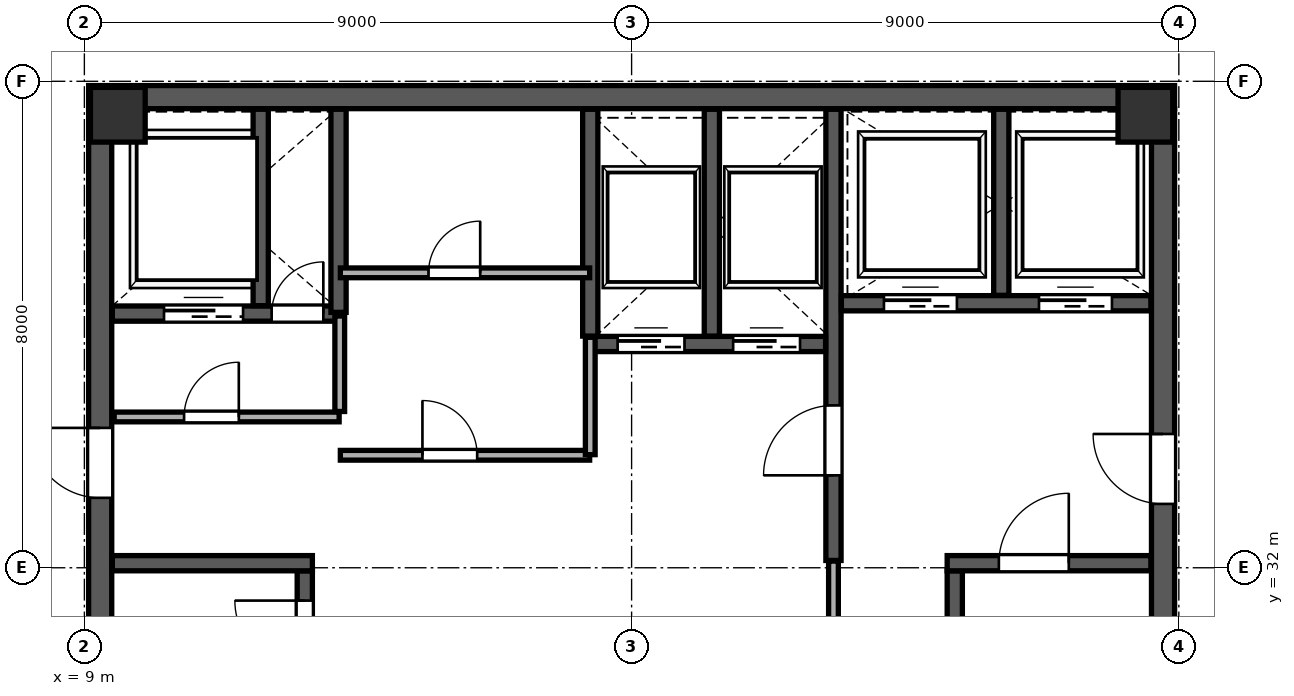
"""IFC4 building model, lengths in metres.
Left out: names, types, materials, properties, quantities, classifications, styles, units other than length and angle.
Written with IfcOpenShell. Run it as: python <this file> out.ifc"""

import sys

from ifc_helpers import new_model, si_unit, direction, frame, frame_2d, origin, origin_2d, place, context, subcontext, project, spatial, rectangle, extrude, source, transform, mapped, element, fill, save


model = new_model("IFC4")
c1 = context("Model", 3, precision=1e-05, world=origin(), true_north=direction((0.0, 1.0)))
c2 = subcontext(c1, "Body", "Model", "MODEL_VIEW")
j1 = project(units=[si_unit("LENGTHUNIT", "METRE"), si_unit("PLANEANGLEUNIT", "RADIAN")], contexts=[c1])
p1 = place(None, origin())
s1 = spatial("IfcSite", under=j1, at=p1, CompositionType="ELEMENT")
p2 = place(p1, origin())
s2 = spatial("IfcBuilding", under=s1, at=p2, CompositionType="ELEMENT")
p3 = place(p2, frame((0.0, 0.0, 319.8)))
s3 = spatial("IfcBuildingStorey", under=s2, at=p3, CompositionType="ELEMENT", Elevation=319.8)
m1 = source(origin(), c2, "Body", "SweptSolid", [
    extrude(rectangle(XDim=0.9, YDim=0.9, at=origin_2d()), origin(), (0.0, 0.0, 1.0), 4.198),
])
for number, where, z_axis, x_axis in (
    (1, (9.55, 39.45, 0.001), (0.0, 0.0, 1.0), (1.0, 0.0, 0.0)),
    (2, (26.45, 39.45, 0.001), (0.0, 0.0, 1.0), (1.0, 0.0, 0.0)),
):
    element("IfcColumn", number, at=place(p3, frame(where, z_axis=z_axis, x_axis=x_axis)), inside=s3, PredefinedType="COLUMN", context=c2, shape_type="MappedRepresentation", body=[
        mapped(m1, transform((0.0, 0.0, 0.0), scale=1.0)),
    ])
p4 = place(p3, frame((9.26, 24.45, 0.0), z_axis=(0.0, 0.0, 1.0), x_axis=(0.0, 1.0, 0.0)))
e3 = element("IfcWall", 3, at=p4, inside=s3, PredefinedType="SHEAR", context=c2, shape_type="SweptSolid", body=[
    extrude(rectangle(XDim=15.1, YDim=0.38, at=frame_2d((7.55, 0.0))), origin(), (0.0, 0.0, 1.0), 3.96),
])
p5 = place(p4, frame((8.7, 0.0, 0.0)))
e4 = element("IfcOpeningElement", 4, at=p5, cuts=e3, PredefinedType="OPENING", context=c2, shape_type="SweptSolid", body=[
    extrude(rectangle(XDim=1.15, YDim=2.2, at=frame_2d((0.575, 1.1))), frame((0.0, 0.2, 0.0), z_axis=(0.0, -1.0, 0.0), x_axis=(1.0, 0.0, 0.0)), (0.0, 0.0, 1.0), 0.4),
])
p6 = place(p3, frame((26.74, 24.45, 0.0), z_axis=(0.0, 0.0, 1.0), x_axis=(0.0, 1.0, 0.0)))
e5 = element("IfcWall", 5, at=p6, inside=s3, PredefinedType="SHEAR", context=c2, shape_type="SweptSolid", body=[
    extrude(rectangle(XDim=15.1, YDim=0.38, at=frame_2d((7.55, 0.0))), origin(), (0.0, 0.0, 1.0), 3.96),
])
p7 = place(p6, frame((8.6, 0.0, 0.0)))
e6 = element("IfcOpeningElement", 6, at=p7, cuts=e5, PredefinedType="OPENING", context=c2, shape_type="SweptSolid", body=[
    extrude(rectangle(XDim=1.15, YDim=2.2, at=frame_2d((0.575, 1.1))), frame((0.0, 0.2, 0.0), z_axis=(0.0, -1.0, 0.0), x_axis=(1.0, 0.0, 0.0)), (0.0, 0.0, 1.0), 0.4),
])
p8 = place(p3, frame((9.07, 39.74, 0.0), z_axis=(0.0, 0.0, 1.0), x_axis=(1.0, 0.0, 0.0)))
e7 = element("IfcWall", 7, at=p8, inside=s3, PredefinedType="SHEAR", context=c2, shape_type="SweptSolid", body=[
    extrude(rectangle(XDim=17.86, YDim=0.38, at=frame_2d((8.93, 0.0))), origin(), (0.0, 0.0, 1.0), 3.96),
])
p9 = place(p3, frame((12.625, 24.46, 0.0), z_axis=(0.0, 0.0, 1.0), x_axis=(0.0, 1.0, 0.0)))
e8 = element("IfcWall", 8, at=p9, inside=s3, PredefinedType="SHEAR", context=c2, shape_type="SweptSolid", body=[
    extrude(rectangle(XDim=7.49, YDim=0.25, at=frame_2d((3.745, 0.0))), origin(), (0.0, 0.0, 1.0), 3.96),
])
p10 = place(p9, frame((5.85, 0.0, 0.0)))
e9 = element("IfcOpeningElement", 9, at=p10, cuts=e8, PredefinedType="OPENING", context=c2, shape_type="SweptSolid", body=[
    extrude(rectangle(XDim=1.15, YDim=2.2, at=frame_2d((0.575, 1.1))), frame((0.0, 0.135, 0.0), z_axis=(0.0, -1.0, 0.0), x_axis=(1.0, 0.0, 0.0)), (0.0, 0.0, 1.0), 0.27),
])
p11 = place(p3, frame((9.46, 32.075, 0.0), z_axis=(0.0, 0.0, 1.0), x_axis=(1.0, 0.0, 0.0)))
e10 = element("IfcWall", 10, at=p11, inside=s3, PredefinedType="SHEAR", context=c2, shape_type="SweptSolid", body=[
    extrude(rectangle(XDim=3.29, YDim=0.25, at=frame_2d((1.645, 0.0))), origin(), (0.0, 0.0, 1.0), 3.96),
])
p12 = place(p3, frame((23.315, 24.46, 0.0), z_axis=(0.0, 0.0, 1.0), x_axis=(0.0, 1.0, 0.0)))
e11 = element("IfcWall", 11, at=p12, inside=s3, PredefinedType="SHEAR", context=c2, shape_type="SweptSolid", body=[
    extrude(rectangle(XDim=7.49, YDim=0.25, at=frame_2d((3.745, 0.0))), origin(), (0.0, 0.0, 1.0), 3.96),
])
p13 = place(p3, frame((23.19, 32.075, 0.0), z_axis=(0.0, 0.0, 1.0), x_axis=(1.0, 0.0, 0.0)))
e12 = element("IfcWall", 12, at=p13, inside=s3, PredefinedType="SHEAR", context=c2, shape_type="SweptSolid", body=[
    extrude(rectangle(XDim=3.35, YDim=0.25, at=frame_2d((1.675, 0.0))), origin(), (0.0, 0.0, 1.0), 3.96),
])
p14 = place(p13, frame((0.85, 0.0, 0.0)))
e13 = element("IfcOpeningElement", 13, at=p14, cuts=e12, PredefinedType="OPENING", context=c2, shape_type="SweptSolid", body=[
    extrude(rectangle(XDim=1.15, YDim=2.2, at=frame_2d((0.575, 1.1))), frame((0.0, 0.135, 0.0), z_axis=(0.0, -1.0, 0.0), x_axis=(1.0, 0.0, 0.0)), (0.0, 0.0, 1.0), 0.27),
])
p15 = place(p3, frame((21.32, 32.12, 0.0), z_axis=(0.0, 0.0, 1.0), x_axis=(0.0, 1.0, 0.0)))
e14 = element("IfcWall", 14, at=p15, inside=s3, PredefinedType="SHEAR", context=c2, shape_type="SweptSolid", body=[
    extrude(rectangle(XDim=7.42, YDim=0.25, at=frame_2d((3.71, 0.0))), origin(), (0.0, 0.0, 1.0), 3.96),
])
p16 = place(p15, frame((1.4, 0.0, 0.0)))
e15 = element("IfcOpeningElement", 15, at=p16, cuts=e14, PredefinedType="OPENING", context=c2, shape_type="SweptSolid", body=[
    extrude(rectangle(XDim=1.15, YDim=2.2, at=frame_2d((0.575, 1.1))), frame((0.0, 0.135, 0.0), z_axis=(0.0, -1.0, 0.0), x_axis=(1.0, 0.0, 0.0)), (0.0, 0.0, 1.0), 0.27),
])
p17 = place(p3, frame((9.46, 36.18, 0.0), z_axis=(0.0, 0.0, 1.0), x_axis=(1.0, 0.0, 0.0)))
e16 = element("IfcWall", 16, at=p17, inside=s3, PredefinedType="SHEAR", context=c2, shape_type="SweptSolid", body=[
    extrude(rectangle(XDim=3.79, YDim=0.25, at=frame_2d((1.895, 0.0))), origin(), (0.0, 0.0, 1.0), 3.96),
])
p18 = place(p17, frame((2.62, 0.0, 0.0)))
e17 = element("IfcOpeningElement", 17, at=p18, cuts=e16, PredefinedType="OPENING", context=c2, shape_type="SweptSolid", body=[
    extrude(rectangle(XDim=0.85, YDim=2.1, at=frame_2d((0.425, 1.05))), frame((0.0, 0.135, 0.0), z_axis=(0.0, -1.0, 0.0), x_axis=(1.0, 0.0, 0.0)), (0.0, 0.0, 1.0), 0.27),
])
p19 = place(p17, frame((0.85, 0.0, 0.0)))
e18 = element("IfcOpeningElement", 18, at=p19, cuts=e16, PredefinedType="OPENING", context=c2, shape_type="SweptSolid", body=[
    extrude(rectangle(XDim=1.3, YDim=2.25, at=frame_2d((0.65, 1.125))), frame((0.0, 0.135, 0.0), z_axis=(0.0, -1.0, 0.0), x_axis=(1.0, 0.0, 0.0)), (0.0, 0.0, 1.0), 0.27),
])
p20 = place(p3, frame((11.9, 36.31, 0.0), z_axis=(0.0, 0.0, 1.0), x_axis=(0.0, 1.0, 0.0)))
e19 = element("IfcWall", 19, at=p20, inside=s3, PredefinedType="SHEAR", context=c2, shape_type="SweptSolid", body=[
    extrude(rectangle(XDim=3.23, YDim=0.25, at=frame_2d((1.615, 0.0))), origin(), (0.0, 0.0, 1.0), 3.96),
])
p21 = place(p3, frame((21.45, 36.35, 0.0), z_axis=(0.0, 0.0, 1.0), x_axis=(1.0, 0.0, 0.0)))
e20 = element("IfcWall", 20, at=p21, inside=s3, PredefinedType="SHEAR", context=c2, shape_type="SweptSolid", body=[
    extrude(rectangle(XDim=5.09, YDim=0.25, at=frame_2d((2.545, 0.0))), origin(), (0.0, 0.0, 1.0), 3.96),
])
p22 = place(p21, frame((0.7, 0.0, 0.0)))
e21 = element("IfcOpeningElement", 21, at=p22, cuts=e20, PredefinedType="OPENING", context=c2, shape_type="SweptSolid", body=[
    extrude(rectangle(XDim=1.2, YDim=2.2, at=frame_2d((0.6, 1.1))), frame((0.0, 0.135, 0.0), z_axis=(0.0, -1.0, 0.0), x_axis=(1.0, 0.0, 0.0)), (0.0, 0.0, 1.0), 0.27),
])
p23 = place(p21, frame((3.25, 0.0, 0.0)))
e22 = element("IfcOpeningElement", 22, at=p23, cuts=e20, PredefinedType="OPENING", context=c2, shape_type="SweptSolid", body=[
    extrude(rectangle(XDim=1.2, YDim=2.2, at=frame_2d((0.6, 1.1))), frame((0.0, 0.135, 0.0), z_axis=(0.0, -1.0, 0.0), x_axis=(1.0, 0.0, 0.0)), (0.0, 0.0, 1.0), 0.27),
])
p24 = place(p3, frame((24.08, 36.48, 0.0), z_axis=(0.0, 0.0, 1.0), x_axis=(0.0, 1.0, 0.0)))
e23 = element("IfcWall", 23, at=p24, inside=s3, PredefinedType="SHEAR", context=c2, shape_type="SweptSolid", body=[
    extrude(rectangle(XDim=3.06, YDim=0.25, at=frame_2d((1.53, 0.0))), origin(), (0.0, 0.0, 1.0), 3.96),
])
p25 = place(p3, frame((13.18, 36.2, 0.0), z_axis=(0.0, 0.0, 1.0), x_axis=(0.0, 1.0, 0.0)))
e24 = element("IfcWall", 24, at=p25, inside=s3, PredefinedType="SHEAR", context=c2, shape_type="SweptSolid", body=[
    extrude(rectangle(XDim=3.34, YDim=0.25, at=frame_2d((1.67, 0.0))), origin(), (0.0, 0.0, 1.0), 3.96),
])
p26 = place(p3, frame((17.32, 35.68, 0.0), z_axis=(0.0, 0.0, 1.0), x_axis=(1.0, 0.0, 0.0)))
e25 = element("IfcWall", 25, at=p26, inside=s3, PredefinedType="SHEAR", context=c2, shape_type="SweptSolid", body=[
    extrude(rectangle(XDim=3.87, YDim=0.25, at=frame_2d((1.935, 0.0))), origin(), (0.0, 0.0, 1.0), 3.96),
])
p27 = place(p26, frame((0.45, 0.0, 0.0)))
e26 = element("IfcOpeningElement", 26, at=p27, cuts=e25, PredefinedType="OPENING", context=c2, shape_type="SweptSolid", body=[
    extrude(rectangle(XDim=1.1, YDim=2.2, at=frame_2d((0.55, 1.1))), frame((0.0, 0.135, 0.0), z_axis=(0.0, -1.0, 0.0), x_axis=(1.0, 0.0, 0.0)), (0.0, 0.0, 1.0), 0.27),
])
p28 = place(p26, frame((2.35, 0.0, 0.0)))
e27 = element("IfcOpeningElement", 27, at=p28, cuts=e25, PredefinedType="OPENING", context=c2, shape_type="SweptSolid", body=[
    extrude(rectangle(XDim=1.1, YDim=2.2, at=frame_2d((0.55, 1.1))), frame((0.0, 0.135, 0.0), z_axis=(0.0, -1.0, 0.0), x_axis=(1.0, 0.0, 0.0)), (0.0, 0.0, 1.0), 0.27),
])
for number, where, z_axis, x_axis in (
    (28, (17.32, 35.81, 0.0), (0.0, 0.0, 1.0), (0.0, 1.0, 0.0)),
    (29, (19.32, 35.81, 0.0), (0.0, 0.0, 1.0), (0.0, 1.0, 0.0)),
):
    element("IfcWall", number, at=place(p3, frame(where, z_axis=z_axis, x_axis=x_axis)), inside=s3, PredefinedType="SHEAR", context=c2, shape_type="SweptSolid", body=[
        extrude(rectangle(XDim=3.73, YDim=0.25, at=frame_2d((1.865, 0.0))), origin(), (0.0, 0.0, 1.0), 3.96),
    ])
p29 = place(p3, frame((9.49, 34.48, 0.0), z_axis=(0.0, 0.0, 1.0), x_axis=(1.0, 0.0, 0.0)))
e30 = element("IfcWall", 30, at=p29, inside=s3, PredefinedType="PARTITIONING", context=c2, shape_type="SweptSolid", body=[
    extrude(rectangle(XDim=3.7, YDim=0.16, at=frame_2d((1.85, 0.0))), origin(), (0.0, 0.0, 1.0), 3.96),
])
p30 = place(p29, frame((1.15, 0.0, 0.0)))
e31 = element("IfcOpeningElement", 31, at=p30, cuts=e30, PredefinedType="OPENING", context=c2, shape_type="SweptSolid", body=[
    extrude(rectangle(XDim=0.9, YDim=2.15, at=frame_2d((0.45, 1.075))), frame((0.0, 0.09, 0.0), z_axis=(0.0, -1.0, 0.0), x_axis=(1.0, 0.0, 0.0)), (0.0, 0.0, 1.0), 0.18),
])
p31 = place(p3, frame((13.2, 34.57, 0.0), z_axis=(0.0, 0.0, 1.0), x_axis=(0.0, 1.0, 0.0)))
e32 = element("IfcWall", 32, at=p31, inside=s3, PredefinedType="PARTITIONING", context=c2, shape_type="SweptSolid", body=[
    extrude(rectangle(XDim=1.57, YDim=0.16, at=frame_2d((0.785, 0.0))), origin(), (0.0, 0.0, 1.0), 3.96),
])
p32 = place(p3, frame((13.21, 33.85, 0.0), z_axis=(0.0, 0.0, 1.0), x_axis=(1.0, 0.0, 0.0)))
e33 = element("IfcWall", 33, at=p32, inside=s3, PredefinedType="PARTITIONING", context=c2, shape_type="SweptSolid", body=[
    extrude(rectangle(XDim=4.1, YDim=0.16, at=frame_2d((2.05, 0.0))), origin(), (0.0, 0.0, 1.0), 3.96),
])
p33 = place(p32, frame((1.35, 0.0, 0.0)))
e34 = element("IfcOpeningElement", 34, at=p33, cuts=e33, PredefinedType="OPENING", context=c2, shape_type="SweptSolid", body=[
    extrude(rectangle(XDim=0.9, YDim=2.15, at=frame_2d((0.45, 1.075))), frame((0.0, 0.09, 0.0), z_axis=(0.0, -1.0, 0.0), x_axis=(1.0, 0.0, 0.0)), (0.0, 0.0, 1.0), 0.18),
])
p34 = place(p3, frame((17.32, 33.86, 0.0), z_axis=(0.0, 0.0, 1.0), x_axis=(0.0, 1.0, 0.0)))
e35 = element("IfcWall", 35, at=p34, inside=s3, PredefinedType="PARTITIONING", context=c2, shape_type="SweptSolid", body=[
    extrude(rectangle(XDim=1.93, YDim=0.16, at=frame_2d((0.965, 0.0))), origin(), (0.0, 0.0, 1.0), 3.96),
])
p35 = place(p3, frame((13.21, 36.85, 0.0), z_axis=(0.0, 0.0, 1.0), x_axis=(1.0, 0.0, 0.0)))
e36 = element("IfcWall", 36, at=p35, inside=s3, PredefinedType="PARTITIONING", context=c2, shape_type="SweptSolid", body=[
    extrude(rectangle(XDim=4.1, YDim=0.16, at=frame_2d((2.05, 0.0))), origin(), (0.0, 0.0, 1.0), 3.96),
])
p36 = place(p35, frame((1.45, 0.0, 0.0)))
e37 = element("IfcOpeningElement", 37, at=p36, cuts=e36, PredefinedType="OPENING", context=c2, shape_type="SweptSolid", body=[
    extrude(rectangle(XDim=0.85, YDim=2.1, at=frame_2d((0.425, 1.05))), frame((0.0, 0.09, 0.0), z_axis=(0.0, -1.0, 0.0), x_axis=(1.0, 0.0, 0.0)), (0.0, 0.0, 1.0), 0.18),
])
p37 = place(p3, frame((21.32, 29.19, 0.0), z_axis=(0.0, 0.0, 1.0), x_axis=(0.0, 1.0, 0.0)))
e38 = element("IfcWall", 38, at=p37, inside=s3, PredefinedType="PARTITIONING", context=c2, shape_type="SweptSolid", body=[
    extrude(rectangle(XDim=2.92, YDim=0.16, at=frame_2d((1.46, 0.0))), origin(), (0.0, 0.0, 1.0), 3.96),
])
p38 = place(p3, frame((3.742, 32.498, 0.0), z_axis=(0.0, 0.0, 1.0), x_axis=(0.500005830994, -0.866022037233, 0.0)))
e39 = element("IfcWall", 39, at=p38, inside=s3, PredefinedType="PARTITIONING", context=c2, shape_type="SweptSolid", body=[
    extrude(rectangle(XDim=14.07, YDim=0.16, at=frame_2d((7.035, 0.0))), origin(), (0.0, 0.0, 1.0), 3.96),
])
p39 = place(p38, frame((1.15, 0.0, 0.0)))
e40 = element("IfcOpeningElement", 40, at=p39, cuts=e39, PredefinedType="OPENING", context=c2, shape_type="SweptSolid", body=[
    extrude(rectangle(XDim=0.95, YDim=2.15, at=frame_2d((0.475, 1.075))), frame((0.0, 0.09, 0.0), z_axis=(0.0, -1.0, 0.0), x_axis=(1.0, 0.0, 0.0)), (0.0, 0.0, 1.0), 0.18),
])
p40 = place(p3, frame((23.284, 49.669, 0.0), z_axis=(0.0, 0.0, 1.0), x_axis=(0.500004637929, -0.866022726058, 0.0)))
e41 = element("IfcWall", 41, at=p40, inside=s3, PredefinedType="PARTITIONING", context=c2, shape_type="SweptSolid", body=[
    extrude(rectangle(XDim=20.67, YDim=0.115, at=frame_2d((10.335, 0.0))), origin(), (0.0, 0.0, 1.0), 3.96),
])
p41 = place(p40, frame((1.05, 0.0, 0.0)))
e42 = element("IfcOpeningElement", 42, at=p41, cuts=e41, PredefinedType="OPENING", context=c2, shape_type="SweptSolid", body=[
    extrude(rectangle(XDim=0.95, YDim=2.15, at=frame_2d((0.475, 1.075))), frame((0.0, 0.067, 0.0), z_axis=(0.0, -1.0, 0.0), x_axis=(1.0, 0.0, 0.0)), (0.0, 0.0, 1.0), 0.135),
])
p42 = place(p40, frame((8.2, 0.0, 0.0)))
e43 = element("IfcOpeningElement", 43, at=p42, cuts=e41, PredefinedType="OPENING", context=c2, shape_type="SweptSolid", body=[
    extrude(rectangle(XDim=0.95, YDim=2.15, at=frame_2d((0.475, 1.075))), frame((0.0, 0.067, 0.0), z_axis=(0.0, -1.0, 0.0), x_axis=(1.0, 0.0, 0.0)), (0.0, 0.0, 1.0), 0.135),
])
p43 = place(p3, frame((2.506, 37.719, 0.0), z_axis=(0.0, 0.0, 1.0), x_axis=(0.866023290802, 0.500003659775, 0.0)))
e44 = element("IfcWall", 44, at=p43, inside=s3, PredefinedType="PARTITIONING", context=c2, shape_type="SweptSolid", body=[
    extrude(rectangle(XDim=29.61, YDim=0.115, at=frame_2d((14.805, 0.0))), origin(), (0.0, 0.0, 1.0), 3.96),
])
p44 = place(p43, frame((2.1, 0.0, 0.0)))
e45 = element("IfcOpeningElement", 45, at=p44, cuts=e44, PredefinedType="OPENING", context=c2, shape_type="SweptSolid", body=[
    extrude(rectangle(XDim=0.95, YDim=2.15, at=frame_2d((0.475, 1.075))), frame((0.0, 0.067, 0.0), z_axis=(0.0, -1.0, 0.0), x_axis=(1.0, 0.0, 0.0)), (0.0, 0.0, 1.0), 0.135),
])
p45 = place(p43, frame((11.8, 0.0, 0.0)))
e46 = element("IfcOpeningElement", 46, at=p45, cuts=e44, PredefinedType="OPENING", context=c2, shape_type="SweptSolid", body=[
    extrude(rectangle(XDim=0.95, YDim=2.15, at=frame_2d((0.475, 1.075))), frame((0.0, 0.067, 0.0), z_axis=(0.0, -1.0, 0.0), x_axis=(1.0, 0.0, 0.0)), (0.0, 0.0, 1.0), 0.135),
])
m2 = source(origin(), c2, "Body", "SweptSolid", [
    extrude(rectangle(XDim=1.15, YDim=2.2, at=frame_2d((0.575, 1.1))), frame((0.0, 0.025, 0.0), z_axis=(0.0, -1.0, 0.0), x_axis=(1.0, 0.0, 0.0)), (0.0, 0.0, 1.0), 0.05),
])
p46 = place(p10, origin())
e47 = element("IfcDoor", 47, at=p46, inside=s3, OperationType="SINGLE_SWING_RIGHT", PredefinedType="DOOR", context=c2, shape_type="MappedRepresentation", body=[
    mapped(m2, transform((0.0, 0.0, 0.0), scale=1.0)),
])
fill(e9, e47)
m3 = source(origin(), c2, "Body", "SweptSolid", [
    extrude(rectangle(XDim=1.15, YDim=2.2, at=frame_2d((0.575, 1.1))), frame((0.0, 0.025, 0.0), z_axis=(0.0, -1.0, 0.0), x_axis=(1.0, 0.0, 0.0)), (0.0, 0.0, 1.0), 0.05),
])
p47 = place(p16, origin())
e48 = element("IfcDoor", 48, at=p47, inside=s3, OperationType="SINGLE_SWING_LEFT", PredefinedType="DOOR", context=c2, shape_type="MappedRepresentation", body=[
    mapped(m3, transform((0.0, 0.0, 0.0), scale=1.0)),
])
fill(e15, e48)
p48 = place(p14, origin())
e49 = element("IfcDoor", 49, at=p48, inside=s3, OperationType="SINGLE_SWING_RIGHT", PredefinedType="DOOR", context=c2, shape_type="MappedRepresentation", body=[
    mapped(m2, transform((0.0, 0.0, 0.0), scale=1.0)),
])
fill(e13, e49)
p49 = place(p7, origin())
e50 = element("IfcDoor", 50, at=p49, inside=s3, OperationType="SINGLE_SWING_RIGHT", PredefinedType="DOOR", context=c2, shape_type="MappedRepresentation", body=[
    mapped(m3, transform((0.0, 0.0, 0.0), scale=1.0)),
])
fill(e6, e50)
p50 = place(p5, origin())
e51 = element("IfcDoor", 51, at=p50, inside=s3, OperationType="SINGLE_SWING_RIGHT", PredefinedType="DOOR", context=c2, shape_type="MappedRepresentation", body=[
    mapped(m3, transform((0.0, 0.0, 0.0), scale=1.0)),
])
fill(e4, e51)
m4 = source(origin(), c2, "Body", "SweptSolid", [
    extrude(rectangle(XDim=0.85, YDim=2.1, at=frame_2d((0.425, 1.05))), frame((0.0, 0.025, 0.0), z_axis=(0.0, -1.0, 0.0), x_axis=(1.0, 0.0, 0.0)), (0.0, 0.0, 1.0), 0.05),
])
p51 = place(p18, origin())
e52 = element("IfcDoor", 52, at=p51, inside=s3, OperationType="SINGLE_SWING_RIGHT", PredefinedType="DOOR", context=c2, shape_type="MappedRepresentation", body=[
    mapped(m4, transform((0.0, 0.0, 0.0), scale=1.0)),
])
fill(e17, e52)
m5 = source(origin(), c2, "Body", "SweptSolid", [
    extrude(rectangle(XDim=1.1, YDim=2.2, at=frame_2d((0.55, 1.1))), frame((0.0, 0.025, 0.0), z_axis=(0.0, -1.0, 0.0), x_axis=(1.0, 0.0, 0.0)), (0.0, 0.0, 1.0), 0.05),
])
p52 = place(p27, origin())
e53 = element("IfcDoor", 53, at=p52, inside=s3, OperationType="SLIDING_TO_LEFT", PredefinedType="DOOR", context=c2, shape_type="MappedRepresentation", body=[
    mapped(m5, transform((0.0, 0.0, 0.0), scale=1.0)),
])
fill(e26, e53)
p53 = place(p28, origin())
e54 = element("IfcDoor", 54, at=p53, inside=s3, OperationType="SLIDING_TO_RIGHT", PredefinedType="DOOR", context=c2, shape_type="MappedRepresentation", body=[
    mapped(m5, transform((0.0, 0.0, 0.0), scale=1.0)),
])
fill(e27, e54)
m6 = source(origin(), c2, "Body", "SweptSolid", [
    extrude(rectangle(XDim=1.2, YDim=2.2, at=frame_2d((0.6, 1.1))), frame((0.0, 0.025, 0.0), z_axis=(0.0, -1.0, 0.0), x_axis=(1.0, 0.0, 0.0)), (0.0, 0.0, 1.0), 0.05),
])
p54 = place(p22, origin())
e55 = element("IfcDoor", 55, at=p54, inside=s3, OperationType="SLIDING_TO_LEFT", PredefinedType="DOOR", context=c2, shape_type="MappedRepresentation", body=[
    mapped(m6, transform((0.0, 0.0, 0.0), scale=1.0)),
])
fill(e21, e55)
p55 = place(p23, origin())
e56 = element("IfcDoor", 56, at=p55, inside=s3, OperationType="SLIDING_TO_RIGHT", PredefinedType="DOOR", context=c2, shape_type="MappedRepresentation", body=[
    mapped(m6, transform((0.0, 0.0, 0.0), scale=1.0)),
])
fill(e22, e56)
m7 = source(origin(), c2, "Body", "SweptSolid", [
    extrude(rectangle(XDim=1.3, YDim=2.25, at=frame_2d((0.65, 1.125))), frame((0.0, 0.025, 0.0), z_axis=(0.0, -1.0, 0.0), x_axis=(1.0, 0.0, 0.0)), (0.0, 0.0, 1.0), 0.05),
])
p56 = place(p19, origin())
e57 = element("IfcDoor", 57, at=p56, inside=s3, OperationType="SLIDING_TO_LEFT", PredefinedType="DOOR", context=c2, shape_type="MappedRepresentation", body=[
    mapped(m7, transform((0.0, 0.0, 0.0), scale=1.0)),
])
fill(e18, e57)
m8 = source(origin(), c2, "Body", "SweptSolid", [
    extrude(rectangle(XDim=0.9, YDim=2.15, at=frame_2d((0.45, 1.075))), frame((0.0, 0.025, 0.0), z_axis=(0.0, -1.0, 0.0), x_axis=(1.0, 0.0, 0.0)), (0.0, 0.0, 1.0), 0.05),
])
p57 = place(p30, origin())
e58 = element("IfcDoor", 58, at=p57, inside=s3, OperationType="SINGLE_SWING_RIGHT", PredefinedType="DOOR", context=c2, shape_type="MappedRepresentation", body=[
    mapped(m8, transform((0.0, 0.0, 0.0), scale=1.0)),
])
fill(e31, e58)
p58 = place(p33, origin())
e59 = element("IfcDoor", 59, at=p58, inside=s3, OperationType="SINGLE_SWING_LEFT", PredefinedType="DOOR", context=c2, shape_type="MappedRepresentation", body=[
    mapped(m8, transform((0.0, 0.0, 0.0), scale=1.0)),
])
fill(e34, e59)
p59 = place(p36, origin())
e60 = element("IfcDoor", 60, at=p59, inside=s3, OperationType="SINGLE_SWING_RIGHT", PredefinedType="DOOR", context=c2, shape_type="MappedRepresentation", body=[
    mapped(m4, transform((0.0, 0.0, 0.0), scale=1.0)),
])
fill(e37, e60)
save(model, sys.argv[1])
